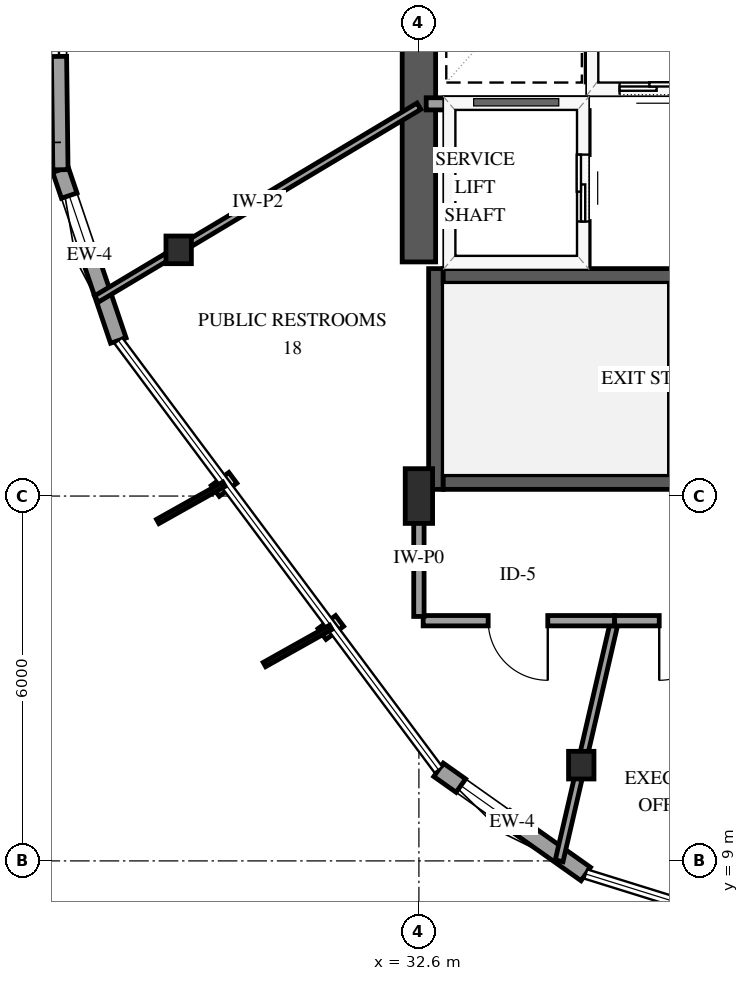
"""IFC4 building model, lengths in metres.
Left out: names, types, materials, properties, quantities, classifications, styles, units other than length and angle.
Written with IfcOpenShell. Run it as: python <this file> out.ifc"""

import sys

from ifc_helpers import new_model, si_unit, direction, frame, frame_2d, origin, origin_2d, place, context, subcontext, project, spatial, rectangle, i_section, extrude, element, fill, save


model = new_model("IFC4")
c1 = context("Model", 3, precision=1e-05, world=origin(), true_north=direction((0.0, 1.0)))
c2 = subcontext(c1, "Body", "Model", "MODEL_VIEW")
j1 = project(units=[si_unit("LENGTHUNIT", "METRE"), si_unit("PLANEANGLEUNIT", "RADIAN")], contexts=[c1])
p1 = place(None, origin())
s1 = spatial("IfcSite", under=j1, at=p1, CompositionType="ELEMENT")
p2 = place(p1, origin())
s2 = spatial("IfcBuilding", under=s1, at=p2, CompositionType="ELEMENT")
p3 = place(p2, frame((0.0, 0.0, 106.9)))
s3 = spatial("IfcBuildingStorey", under=s2, at=p3, CompositionType="ELEMENT", Elevation=106.9)
p4 = place(p3, frame((32.88, 15.11, 0.0), z_axis=(0.0, 0.0, 1.0), x_axis=(0.0, 1.0, 0.0)))
e1 = element("IfcWall", 1, at=p4, inside=s3, PredefinedType="SHEAR", context=c2, shape_type="SweptSolid", body=[
    extrude(rectangle(XDim=3.63, YDim=0.24, at=frame_2d((1.815, 0.0))), origin(), (0.0, 0.0, 1.0), 3.9),
])
for number, where, z_axis, x_axis in (
    (2, (33.0, 15.23, 0.0), (0.0, 0.0, 1.0), (1.0, 0.0, 0.0)),
    (3, (33.0, 18.62, 0.0), (0.0, 0.0, 1.0), (1.0, 0.0, 0.0)),
):
    element("IfcWall", number, at=place(p3, frame(where, z_axis=z_axis, x_axis=x_axis)), inside=s3, PredefinedType="SHEAR", context=c2, shape_type="SweptSolid", body=[
        extrude(rectangle(XDim=8.0, YDim=0.24, at=frame_2d((4.0, 0.0))), origin(), (0.0, 0.0, 1.0), 3.9),
    ])
p5 = place(p3, frame((32.6, 18.85, 0.0), z_axis=(0.0, 0.0, 1.0), x_axis=(0.0, 1.0, 0.0)))
e4 = element("IfcWall", 4, at=p5, inside=s3, PredefinedType="SHEAR", context=c2, shape_type="SweptSolid", body=[
    extrude(rectangle(XDim=12.3, YDim=0.55, at=frame_2d((6.15, 0.0))), origin(), (0.0, 0.0, 1.0), 3.9),
])
p6 = place(p3, frame((32.6, 15.0, 0.0), z_axis=(0.0, 0.0, 1.0), x_axis=(1.0, 0.0, 0.0)))
e5 = element("IfcColumn", 5, at=p6, inside=s3, PredefinedType="PILASTER", context=c2, shape_type="SweptSolid", body=[
    extrude(rectangle(XDim=0.45, YDim=0.9, at=origin_2d()), origin(), (0.0, 0.0, 1.0), 3.9),
])
for number, where, z_axis, x_axis in (
    (6, (28.649, 19.049, 0.0), (0.0, 0.0, 1.0), (1.0, 0.0, 0.0)),
    (7, (35.27, 10.575, 0.0), (0.0, 0.0, 1.0), (1.0, 0.0, 0.0)),
):
    element("IfcColumn", number, at=place(p3, frame(where, z_axis=z_axis, x_axis=x_axis)), inside=s3, PredefinedType="COLUMN", context=c2, shape_type="SweptSolid", body=[
        extrude(i_section(OverallWidth=0.418, OverallDepth=0.455, WebThickness=0.042, FlangeThickness=0.068, FilletRadius=0.038, at=origin_2d()), origin(), (0.0, 0.0, 1.0), 3.9),
    ])
p7 = place(p3, frame((26.705, 20.366, 0.0), z_axis=(0.0, 0.0, 1.0), x_axis=(0.320964212706, -0.947091323032, 0.0)))
e8 = element("IfcWall", 8, at=p7, inside=s3, PredefinedType="SOLIDWALL", context=c2, shape_type="SweptSolid", body=[
    extrude(rectangle(XDim=2.967, YDim=0.27, at=frame_2d((1.483, 0.0))), origin(), (0.0, 0.0, 1.0), 2.979),
])
p8 = place(p7, frame((0.45, 0.0, 0.75)))
e9 = element("IfcOpeningElement", 9, at=p8, cuts=e8, PredefinedType="OPENING", context=c2, shape_type="SweptSolid", body=[
    extrude(rectangle(XDim=0.9, YDim=1.5, at=frame_2d((0.45, 0.75))), frame((0.0, 0.145, 0.0), z_axis=(0.0, -1.0, 0.0), x_axis=(1.0, 0.0, 0.0)), (0.0, 0.0, 1.0), 0.29),
])
p9 = place(p3, frame((26.594, 29.172, 0.0), z_axis=(0.0, 0.0, 1.0), x_axis=(0.012558271015, -0.999921141805, 0.0)))
e10 = element("IfcWall", 10, at=p9, inside=s3, PredefinedType="SOLIDWALL", context=c2, shape_type="SweptSolid", body=[
    extrude(rectangle(XDim=8.807, YDim=0.25, at=frame_2d((4.403, 0.0))), origin(), (0.0, 0.0, 1.0), 2.979),
])
p10 = place(p9, frame((3.903, 0.0, 0.0)))
e11 = element("IfcOpeningElement", 11, at=p10, cuts=e10, PredefinedType="OPENING", context=c2, shape_type="SweptSolid", body=[
    extrude(rectangle(XDim=1.05, YDim=2.15, at=frame_2d((0.525, 1.075))), frame((0.0, 0.135, 0.0), z_axis=(0.0, -1.0, 0.0), x_axis=(1.0, 0.0, 0.0)), (0.0, 0.0, 1.0), 0.27),
])
p11 = place(p9, frame((0.44, 0.0, 0.72)))
e12 = element("IfcOpeningElement", 12, at=p11, cuts=e10, PredefinedType="OPENING", context=c2, shape_type="SweptSolid", body=[
    extrude(rectangle(XDim=1.35, YDim=1.65, at=frame_2d((0.675, 0.825))), frame((0.0, 0.135, 0.0), z_axis=(0.0, -1.0, 0.0), x_axis=(1.0, 0.0, 0.0)), (0.0, 0.0, 1.0), 0.27),
])
p12 = place(p9, frame((5.593, 0.0, 0.72)))
e13 = element("IfcOpeningElement", 13, at=p12, cuts=e10, PredefinedType="OPENING", context=c2, shape_type="SweptSolid", body=[
    extrude(rectangle(XDim=1.35, YDim=1.65, at=frame_2d((0.675, 0.825))), frame((0.0, 0.135, 0.0), z_axis=(0.0, -1.0, 0.0), x_axis=(1.0, 0.0, 0.0)), (0.0, 0.0, 1.0), 0.27),
])
p13 = place(p3, frame((32.923, 10.498, 0.0), z_axis=(0.0, 0.0, 1.0), x_axis=(0.816333298617, -0.577581116009, 0.0)))
e14 = element("IfcWall", 14, at=p13, inside=s3, PredefinedType="SOLIDWALL", context=c2, shape_type="SweptSolid", body=[
    extrude(rectangle(XDim=2.967, YDim=0.27, at=frame_2d((1.483, 0.0))), origin(), (0.0, 0.0, 1.0), 2.979),
])
p14 = place(p13, frame((0.45, 0.0, 0.75)))
e15 = element("IfcOpeningElement", 15, at=p14, cuts=e14, PredefinedType="OPENING", context=c2, shape_type="SweptSolid", body=[
    extrude(rectangle(XDim=0.9, YDim=1.5, at=frame_2d((0.45, 0.75))), frame((0.0, 0.145, 0.0), z_axis=(0.0, -1.0, 0.0), x_axis=(1.0, 0.0, 0.0)), (0.0, 0.0, 1.0), 0.29),
])
p15 = place(p3, frame((35.45, 21.7, 0.0), z_axis=(0.0, 0.0, 1.0), x_axis=(1.0, 0.0, 0.0)))
e16 = element("IfcWall", 16, at=p15, inside=s3, PredefinedType="SOLIDWALL", context=c2, shape_type="SweptSolid", body=[
    extrude(rectangle(XDim=2.0, YDim=0.2, at=frame_2d((1.0, 0.0))), origin(), (0.0, 0.0, 1.0), 3.6),
])
p16 = place(p15, frame((0.45, 0.0, 0.0)))
e17 = element("IfcOpeningElement", 17, at=p16, cuts=e16, PredefinedType="OPENING", context=c2, shape_type="SweptSolid", body=[
    extrude(rectangle(XDim=1.1, YDim=2.15, at=frame_2d((0.55, 1.075))), frame((0.0, 0.11, 0.0), z_axis=(0.0, -1.0, 0.0), x_axis=(1.0, 0.0, 0.0)), (0.0, 0.0, 1.0), 0.22),
])
p17 = place(p3, frame((35.45, 21.81, 0.0), z_axis=(0.0, 0.0, 1.0), x_axis=(0.0, 1.0, 0.0)))
e18 = element("IfcWall", 18, at=p17, inside=s3, PredefinedType="SOLIDWALL", context=c2, shape_type="SweptSolid", body=[
    extrude(rectangle(XDim=2.38, YDim=0.2, at=frame_2d((1.19, 0.0))), origin(), (0.0, 0.0, 1.0), 3.6),
])
p18 = place(p3, frame((32.72, 21.45, 0.0), z_axis=(0.0, 0.0, 1.0), x_axis=(1.0, 0.0, 0.0)))
e19 = element("IfcWall", 19, at=p18, inside=s3, PredefinedType="SOLIDWALL", context=c2, shape_type="SweptSolid", body=[
    extrude(rectangle(XDim=2.58, YDim=0.2, at=frame_2d((1.29, 0.0))), origin(), (0.0, 0.0, 1.0), 3.6),
])
p19 = place(p3, frame((35.3, 18.79, 0.0), z_axis=(0.0, 0.0, 1.0), x_axis=(0.0, 1.0, 0.0)))
e20 = element("IfcWall", 20, at=p19, inside=s3, PredefinedType="SOLIDWALL", context=c2, shape_type="SweptSolid", body=[
    extrude(rectangle(XDim=2.55, YDim=0.2, at=frame_2d((1.275, 0.0))), origin(), (0.0, 0.0, 1.0), 3.6),
])
p20 = place(p19, frame((0.725, 0.0, 0.0)))
e21 = element("IfcOpeningElement", 21, at=p20, cuts=e20, PredefinedType="OPENING", context=c2, shape_type="SweptSolid", body=[
    extrude(rectangle(XDim=1.1, YDim=2.15, at=frame_2d((0.55, 1.075))), frame((0.0, 0.11, 0.0), z_axis=(0.0, -1.0, 0.0), x_axis=(1.0, 0.0, 0.0)), (0.0, 0.0, 1.0), 0.22),
])
p21 = place(p3, frame((32.6, 21.411, 0.0), z_axis=(0.0, 0.0, 1.0), x_axis=(-0.858297424283, -0.513152542105, 0.0)))
e22 = element("IfcWall", 22, at=p21, inside=s3, PredefinedType="PARTITIONING", context=c2, shape_type="SweptSolid", body=[
    extrude(rectangle(XDim=6.177, YDim=0.12, at=frame_2d((3.089, 0.0))), origin(), (0.0, 0.0, 1.0), 3.6),
])
p22 = place(p3, frame((35.819, 12.95, 0.0), z_axis=(0.0, 0.0, 1.0), x_axis=(-0.225277405857, -0.974294663031, 0.0)))
e23 = element("IfcWall", 23, at=p22, inside=s3, PredefinedType="PARTITIONING", context=c2, shape_type="SweptSolid", body=[
    extrude(rectangle(XDim=4.053, YDim=0.13, at=frame_2d((2.027, 0.0))), origin(), (0.0, 0.0, 1.0), 2.895),
])
p23 = place(p3, frame((35.819, 12.95, 0.0), z_axis=(0.0, 0.0, 1.0), x_axis=(-1.0, 0.0, 0.0)))
e24 = element("IfcWall", 24, at=p23, inside=s3, PredefinedType="PARTITIONING", context=c2, shape_type="SweptSolid", body=[
    extrude(rectangle(XDim=3.149, YDim=0.17, at=frame_2d((1.575, 0.0))), origin(), (0.0, 0.0, 1.0), 3.6),
])
p24 = place(p23, frame((1.1, 0.0, 0.0)))
e25 = element("IfcOpeningElement", 25, at=p24, cuts=e24, PredefinedType="OPENING", context=c2, shape_type="SweptSolid", body=[
    extrude(rectangle(XDim=0.98, YDim=2.15, at=frame_2d((0.49, 1.075))), frame((0.0, 0.095, 0.0), z_axis=(0.0, -1.0, 0.0), x_axis=(1.0, 0.0, 0.0)), (0.0, 0.0, 1.0), 0.19),
])
p25 = place(p3, frame((38.294, 12.95, 0.0), z_axis=(0.0, 0.0, 1.0), x_axis=(-1.0, 0.0, 0.0)))
e26 = element("IfcWall", 26, at=p25, inside=s3, PredefinedType="PARTITIONING", context=c2, shape_type="SweptSolid", body=[
    extrude(rectangle(XDim=2.475, YDim=0.17, at=frame_2d((1.237, 0.0))), origin(), (0.0, 0.0, 1.0), 3.6),
])
p26 = place(p25, frame((0.762, 0.0, 0.0)))
e27 = element("IfcOpeningElement", 27, at=p26, cuts=e26, PredefinedType="OPENING", context=c2, shape_type="SweptSolid", body=[
    extrude(rectangle(XDim=0.98, YDim=2.15, at=frame_2d((0.49, 1.075))), frame((0.0, 0.095, 0.0), z_axis=(0.0, -1.0, 0.0), x_axis=(1.0, 0.0, 0.0)), (0.0, 0.0, 1.0), 0.19),
])
p27 = place(p3, frame((32.6, 13.02, 0.0), z_axis=(0.0, 0.0, 1.0), x_axis=(0.0, 1.0, 0.0)))
e28 = element("IfcWall", 28, at=p27, inside=s3, PredefinedType="PARTITIONING", context=c2, shape_type="SweptSolid", body=[
    extrude(rectangle(XDim=1.91, YDim=0.17, at=frame_2d((0.955, 0.0))), origin(), (0.0, 0.0, 1.0), 3.6),
])
p28 = place(p8, origin())
e29 = element("IfcWindow", 29, at=p28, inside=s3, PartitioningType="SINGLE_PANEL", PredefinedType="WINDOW", context=c2, shape_type="SweptSolid", body=[
    extrude(rectangle(XDim=0.9, YDim=1.5, at=frame_2d((0.45, 0.75))), frame((0.0, 0.03, 0.0), z_axis=(0.0, -1.0, 0.0), x_axis=(1.0, 0.0, 0.0)), (0.0, 0.0, 1.0), 0.06),
])
fill(e9, e29)
p29 = place(p12, origin())
e30 = element("IfcWindow", 30, at=p29, inside=s3, PartitioningType="SINGLE_PANEL", PredefinedType="WINDOW", context=c2, shape_type="SweptSolid", body=[
    extrude(rectangle(XDim=1.35, YDim=1.65, at=frame_2d((0.675, 0.825))), frame((0.0, 0.03, 0.0), z_axis=(0.0, -1.0, 0.0), x_axis=(1.0, 0.0, 0.0)), (0.0, 0.0, 1.0), 0.06),
])
fill(e13, e30)
p30 = place(p14, origin())
e31 = element("IfcWindow", 31, at=p30, inside=s3, PartitioningType="SINGLE_PANEL", PredefinedType="WINDOW", context=c2, shape_type="SweptSolid", body=[
    extrude(rectangle(XDim=0.9, YDim=1.5, at=frame_2d((0.45, 0.75))), frame((0.0, 0.03, 0.0), z_axis=(0.0, -1.0, 0.0), x_axis=(1.0, 0.0, 0.0)), (0.0, 0.0, 1.0), 0.06),
])
fill(e15, e31)
p31 = place(p16, origin())
e32 = element("IfcDoor", 32, at=p31, inside=s3, OperationType="SLIDING_TO_LEFT", PredefinedType="DOOR", context=c2, shape_type="SweptSolid", body=[
    extrude(rectangle(XDim=1.1, YDim=2.15, at=frame_2d((0.55, 1.075))), frame((0.0, 0.025, 0.0), z_axis=(0.0, -1.0, 0.0), x_axis=(1.0, 0.0, 0.0)), (0.0, 0.0, 1.0), 0.05),
])
fill(e17, e32)
p32 = place(p20, origin())
e33 = element("IfcDoor", 33, at=p32, inside=s3, OperationType="SLIDING_TO_LEFT", PredefinedType="DOOR", context=c2, shape_type="SweptSolid", body=[
    extrude(rectangle(XDim=1.1, YDim=2.15, at=frame_2d((0.55, 1.075))), frame((0.0, 0.025, 0.0), z_axis=(0.0, -1.0, 0.0), x_axis=(1.0, 0.0, 0.0)), (0.0, 0.0, 1.0), 0.05),
])
fill(e21, e33)
p33 = place(p24, origin())
e34 = element("IfcDoor", 34, at=p33, inside=s3, OperationType="SINGLE_SWING_LEFT", PredefinedType="DOOR", context=c2, shape_type="SweptSolid", body=[
    extrude(rectangle(XDim=0.98, YDim=2.15, at=frame_2d((0.49, 1.075))), frame((0.0, 0.025, 0.0), z_axis=(0.0, -1.0, 0.0), x_axis=(1.0, 0.0, 0.0)), (0.0, 0.0, 1.0), 0.05),
])
fill(e25, e34)
p34 = place(p26, origin())
e35 = element("IfcDoor", 35, at=p34, inside=s3, OperationType="SINGLE_SWING_RIGHT", PredefinedType="DOOR", context=c2, shape_type="SweptSolid", body=[
    extrude(rectangle(XDim=0.98, YDim=2.15, at=frame_2d((0.49, 1.075))), frame((0.0, 0.025, 0.0), z_axis=(0.0, -1.0, 0.0), x_axis=(1.0, 0.0, 0.0)), (0.0, 0.0, 1.0), 0.05),
])
fill(e27, e35)
save(model, sys.argv[1])
